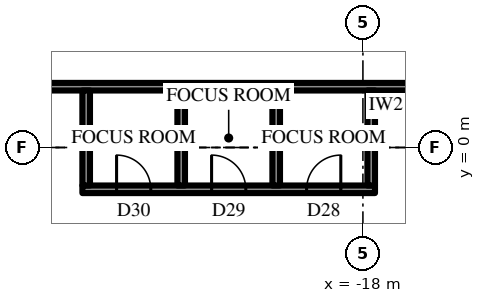
"""IFC4 building model, lengths in metres.
Left out: names, types, materials, properties, quantities, classifications, styles, units other than length and angle.
Written with IfcOpenShell. Run it as: python <this file> out.ifc"""

import sys

from ifc_helpers import new_model, si_unit, direction, frame, frame_2d, origin, place, context, subcontext, project, spatial, rectangle, extrude, element, fill, save


model = new_model("IFC4")
c1 = context("Model", 3, precision=1e-05, world=origin(), true_north=direction((0.0, 1.0)))
c2 = subcontext(c1, "Body", "Model", "MODEL_VIEW")
j1 = project(units=[si_unit("LENGTHUNIT", "METRE"), si_unit("PLANEANGLEUNIT", "RADIAN")], contexts=[c1])
p1 = place(None, origin())
s1 = spatial("IfcSite", under=j1, at=p1, CompositionType="ELEMENT")
p2 = place(p1, origin())
s2 = spatial("IfcBuilding", under=s1, at=p2, CompositionType="ELEMENT")
p3 = place(p2, frame((0.0, 0.0, 387.1)))
s3 = spatial("IfcBuildingStorey", under=s2, at=p3, CompositionType="ELEMENT", Elevation=387.1)
p4 = place(p3, frame((-12.425, 1.6, 0.0), z_axis=(0.0, 0.0, 1.0), x_axis=(-1.0, 0.0, 0.0)))
e1 = element("IfcWall", 1, at=p4, inside=s3, PredefinedType="PARTITIONING", context=c2, shape_type="SweptSolid", body=[
    extrude(rectangle(XDim=16.558, YDim=0.2, at=frame_2d((8.279, 0.0))), origin(), (0.0, 0.0, 1.0), 4.0),
])
p5 = place(p4, frame((1.156, 0.0, 0.0)))
e2 = element("IfcOpeningElement", 2, at=p5, cuts=e1, PredefinedType="OPENING", context=c2, shape_type="SweptSolid", body=[
    extrude(rectangle(XDim=1.0, YDim=2.2, at=frame_2d((0.5, 1.1))), frame((0.0, 0.11, 0.0), z_axis=(0.0, -1.0, 0.0), x_axis=(1.0, 0.0, 0.0)), (0.0, 0.0, 1.0), 0.22),
])
p6 = place(p3, frame((-17.682, -1.1, 0.0), z_axis=(0.0, 0.0, 1.0), x_axis=(-1.0, 0.0, 0.0)))
e3 = element("IfcWall", 3, at=p6, inside=s3, PredefinedType="PARTITIONING", context=c2, shape_type="SweptSolid", body=[
    extrude(rectangle(XDim=7.7, YDim=0.2, at=frame_2d((3.85, 0.0))), origin(), (0.0, 0.0, 1.0), 4.0),
])
p7 = place(p6, frame((0.9, 0.0, 0.0)))
e4 = element("IfcOpeningElement", 4, at=p7, cuts=e3, PredefinedType="OPENING", context=c2, shape_type="SweptSolid", body=[
    extrude(rectangle(XDim=0.9, YDim=2.2, at=frame_2d((0.45, 1.1))), frame((0.0, 0.11, 0.0), z_axis=(0.0, -1.0, 0.0), x_axis=(1.0, 0.0, 0.0)), (0.0, 0.0, 1.0), 0.22),
])
p8 = place(p6, frame((3.4, 0.0, 0.0)))
e5 = element("IfcOpeningElement", 5, at=p8, cuts=e3, PredefinedType="OPENING", context=c2, shape_type="SweptSolid", body=[
    extrude(rectangle(XDim=0.9, YDim=2.2, at=frame_2d((0.45, 1.1))), frame((0.0, 0.11, 0.0), z_axis=(0.0, -1.0, 0.0), x_axis=(1.0, 0.0, 0.0)), (0.0, 0.0, 1.0), 0.22),
])
p9 = place(p6, frame((5.9, 0.0, 0.0)))
e6 = element("IfcOpeningElement", 6, at=p9, cuts=e3, PredefinedType="OPENING", context=c2, shape_type="SweptSolid", body=[
    extrude(rectangle(XDim=0.9, YDim=2.2, at=frame_2d((0.45, 1.1))), frame((0.0, 0.11, 0.0), z_axis=(0.0, -1.0, 0.0), x_axis=(1.0, 0.0, 0.0)), (0.0, 0.0, 1.0), 0.22),
])
for number, where, z_axis, x_axis in (
    (7, (-17.782, 1.5, 0.0), (0.0, 0.0, 1.0), (0.0, -1.0, 0.0)),
    (8, (-20.282, 1.5, 0.0), (0.0, 0.0, 1.0), (0.0, -1.0, 0.0)),
    (9, (-22.782, 1.5, 0.0), (0.0, 0.0, 1.0), (0.0, -1.0, 0.0)),
    (10, (-25.282, 1.5, 0.0), (0.0, 0.0, 1.0), (0.0, -1.0, 0.0)),
):
    element("IfcWall", number, at=place(p3, frame(where, z_axis=z_axis, x_axis=x_axis)), inside=s3, PredefinedType="PARTITIONING", context=c2, shape_type="SweptSolid", body=[
        extrude(rectangle(XDim=2.5, YDim=0.2, at=frame_2d((1.25, 0.0))), origin(), (0.0, 0.0, 1.0), 4.0),
    ])
p10 = place(p7, frame((0.9, 0.0, 0.0), z_axis=(0.0, 0.0, 1.0), x_axis=(-1.0, 0.0, 0.0)))
e11 = element("IfcDoor", 11, at=p10, inside=s3, OperationType="SINGLE_SWING_LEFT", PredefinedType="DOOR", context=c2, shape_type="SweptSolid", body=[
    extrude(rectangle(XDim=0.9, YDim=2.2, at=frame_2d((0.45, 1.1))), frame((0.0, 0.025, 0.0), z_axis=(0.0, -1.0, 0.0), x_axis=(1.0, 0.0, 0.0)), (0.0, 0.0, 1.0), 0.05),
])
fill(e4, e11)
p11 = place(p8, frame((0.9, 0.0, 0.0), z_axis=(0.0, 0.0, 1.0), x_axis=(-1.0, 0.0, 0.0)))
e12 = element("IfcDoor", 12, at=p11, inside=s3, OperationType="SINGLE_SWING_RIGHT", PredefinedType="DOOR", context=c2, shape_type="SweptSolid", body=[
    extrude(rectangle(XDim=0.9, YDim=2.2, at=frame_2d((0.45, 1.1))), frame((0.0, 0.025, 0.0), z_axis=(0.0, -1.0, 0.0), x_axis=(1.0, 0.0, 0.0)), (0.0, 0.0, 1.0), 0.05),
])
fill(e5, e12)
p12 = place(p9, frame((0.9, 0.0, 0.0), z_axis=(0.0, 0.0, 1.0), x_axis=(-1.0, 0.0, 0.0)))
e13 = element("IfcDoor", 13, at=p12, inside=s3, OperationType="SINGLE_SWING_RIGHT", PredefinedType="DOOR", context=c2, shape_type="SweptSolid", body=[
    extrude(rectangle(XDim=0.9, YDim=2.2, at=frame_2d((0.45, 1.1))), frame((0.0, 0.025, 0.0), z_axis=(0.0, -1.0, 0.0), x_axis=(1.0, 0.0, 0.0)), (0.0, 0.0, 1.0), 0.05),
])
fill(e6, e13)
save(model, sys.argv[1])
